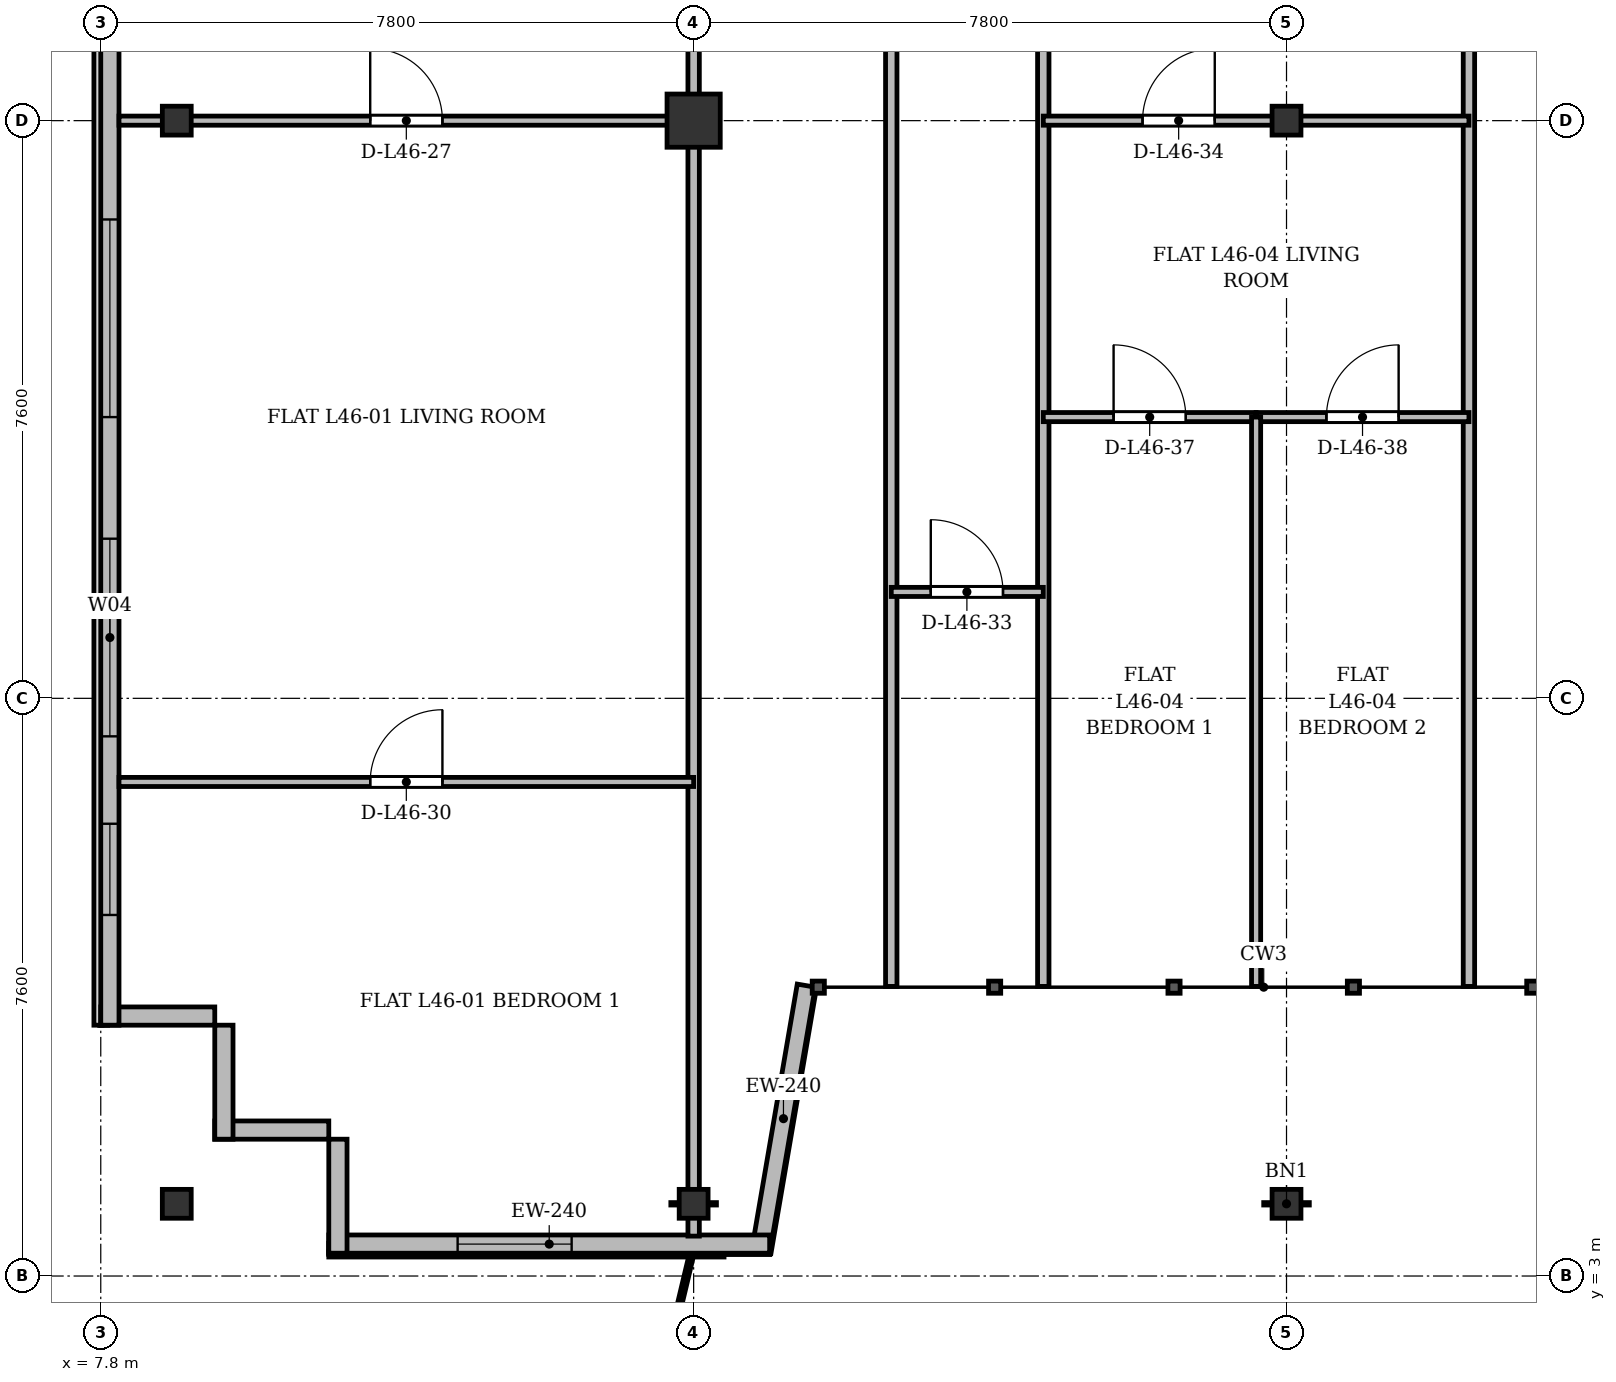
"""IFC4 building model, lengths in metres.
Left out: names, types, materials, properties, quantities, classifications, styles, units other than length and angle.
Written with IfcOpenShell. Run it as: python <this file> out.ifc"""

import sys

from ifc_helpers import new_model, si_unit, direction, frame, frame_2d, origin, origin_2d, place, context, subcontext, project, spatial, rectangle, i_section, extrude, source, transform, mapped, element, fill, save


model = new_model("IFC4")
c1 = context("Model", 3, precision=1e-05, world=origin(), true_north=direction((0.0, 1.0)))
c2 = subcontext(c1, "Body", "Model", "MODEL_VIEW")
j1 = project(units=[si_unit("LENGTHUNIT", "METRE"), si_unit("PLANEANGLEUNIT", "RADIAN")], contexts=[c1])
p1 = place(None, origin())
s1 = spatial("IfcSite", under=j1, at=p1, CompositionType="ELEMENT")
p2 = place(p1, origin())
s2 = spatial("IfcBuilding", under=s1, at=p2, CompositionType="ELEMENT")
p3 = place(p2, frame((0.0, 0.0, 175.3)))
s3 = spatial("IfcBuildingStorey", under=s2, at=p3, CompositionType="ELEMENT", Elevation=175.3)
m1 = source(origin(), c2, "Body", "SweptSolid", [
    extrude(i_section(OverallWidth=0.38, OverallDepth=0.38, WebThickness=0.02, FlangeThickness=0.03, at=origin_2d()), origin(), (0.0, 0.0, 1.0), 3.6),
])
for number, where, z_axis, x_axis in (
    (1, (8.8, 3.95, 0.0), (0.0, 0.0, 1.0), (1.0, 0.0, 0.0)),
    (2, (8.8, 18.2, 0.0), (0.0, 0.0, 1.0), (1.0, 0.0, 0.0)),
    (3, (15.6, 3.95, 0.0), (0.0, 0.0, 1.0), (1.0, 0.0, 0.0)),
):
    element("IfcColumn", number, at=place(p3, frame(where, z_axis=z_axis, x_axis=x_axis)), inside=s3, PredefinedType="COLUMN", context=c2, shape_type="MappedRepresentation", body=[
        mapped(m1, transform((0.0, 0.0, 0.0), x_axis=(1.0, 0.0, 0.0), y_axis=(0.0, 1.0, 0.0), z_axis=(0.0, 0.0, 1.0), scale=1.0)),
    ])
m2 = source(origin(), c2, "Body", "SweptSolid", [
    extrude(rectangle(XDim=0.7, YDim=0.7, at=origin_2d()), origin(), (0.0, 0.0, 1.0), 3.6),
])
p4 = place(p3, frame((15.6, 18.2, 0.0), z_axis=(0.0, 0.0, 1.0), x_axis=(1.0, 0.0, 0.0)))
e4 = element("IfcColumn", 4, at=p4, inside=s3, PredefinedType="COLUMN", context=c2, shape_type="MappedRepresentation", body=[
    mapped(m2, transform((0.0, 0.0, 0.0), x_axis=(1.0, 0.0, 0.0), y_axis=(0.0, 1.0, 0.0), z_axis=(0.0, 0.0, 1.0), scale=1.0)),
])
for number, where, z_axis, x_axis in (
    (5, (23.4, 3.95, 0.0), (0.0, 0.0, 1.0), (1.0, 0.0, 0.0)),
    (6, (23.4, 18.2, 0.0), (0.0, 0.0, 1.0), (1.0, 0.0, 0.0)),
):
    element("IfcColumn", number, at=place(p3, frame(where, z_axis=z_axis, x_axis=x_axis)), inside=s3, PredefinedType="COLUMN", context=c2, shape_type="MappedRepresentation", body=[
        mapped(m1, transform((0.0, 0.0, 0.0), x_axis=(1.0, 0.0, 0.0), y_axis=(0.0, 1.0, 0.0), z_axis=(0.0, 0.0, 1.0), scale=1.0)),
    ])
for number, where, z_axis, x_axis in (
    (7, (10.8, 4.92, 0.0), (0.0, 0.0, 1.0), (-1.0, 0.0, 0.0)),
    (8, (9.42, 4.8, 0.0), (0.0, 0.0, 1.0), (0.0, 1.0, 0.0)),
):
    element("IfcWall", number, at=place(p3, frame(where, z_axis=z_axis, x_axis=x_axis)), inside=s3, PredefinedType="SOLIDWALL", context=c2, shape_type="SweptSolid", body=[
        extrude(rectangle(XDim=1.5, YDim=0.24, at=frame_2d((0.75, 0.0))), origin(), (0.0, 0.0, 1.0), 3.35),
    ])
p5 = place(p3, frame((9.3, 6.42, 0.0), z_axis=(0.0, 0.0, 1.0), x_axis=(-1.0, 0.0, 0.0)))
e9 = element("IfcWall", 9, at=p5, inside=s3, PredefinedType="SOLIDWALL", context=c2, shape_type="SweptSolid", body=[
    extrude(rectangle(XDim=1.5, YDim=0.24, at=frame_2d((0.75, 0.0))), origin(), (0.0, 0.0, 1.0), 2.85),
])
p6 = place(p3, frame((7.92, 6.3, 0.0), z_axis=(0.0, 0.0, 1.0), x_axis=(0.0, 1.0, 0.0)))
e10 = element("IfcWall", 10, at=p6, inside=s3, PredefinedType="SOLIDWALL", context=c2, shape_type="SweptSolid", body=[
    extrude(rectangle(XDim=39.2, YDim=0.24, at=frame_2d((19.6, 0.0))), origin(), (0.0, 0.0, 1.0), 3.35),
])
p7 = place(p6, frame((1.45, 0.0, 0.92)))
e11 = element("IfcOpeningElement", 11, at=p7, cuts=e10, PredefinedType="OPENING", context=c2, shape_type="SweptSolid", body=[
    extrude(rectangle(XDim=1.2, YDim=1.65, at=frame_2d((0.6, 0.825))), frame((0.0, 0.13, 0.0), z_axis=(0.0, -1.0, 0.0), x_axis=(1.0, 0.0, 0.0)), (0.0, 0.0, 1.0), 0.26),
])
p8 = place(p6, frame((3.8, 0.0, 0.92)))
e12 = element("IfcOpeningElement", 12, at=p8, cuts=e10, PredefinedType="OPENING", context=c2, shape_type="SweptSolid", body=[
    extrude(rectangle(XDim=2.6, YDim=1.9, at=frame_2d((1.3, 0.95))), frame((0.0, 0.13, 0.0), z_axis=(0.0, -1.0, 0.0), x_axis=(1.0, 0.0, 0.0)), (0.0, 0.0, 1.0), 0.26),
])
p9 = place(p6, frame((8.0, 0.0, 0.92)))
e13 = element("IfcOpeningElement", 13, at=p9, cuts=e10, PredefinedType="OPENING", context=c2, shape_type="SweptSolid", body=[
    extrude(rectangle(XDim=2.6, YDim=1.9, at=frame_2d((1.3, 0.95))), frame((0.0, 0.13, 0.0), z_axis=(0.0, -1.0, 0.0), x_axis=(1.0, 0.0, 0.0)), (0.0, 0.0, 1.0), 0.26),
])
p10 = place(p6, frame((15.2, 0.0, 0.92)))
e14 = element("IfcOpeningElement", 14, at=p10, cuts=e10, PredefinedType="OPENING", context=c2, shape_type="SweptSolid", body=[
    extrude(rectangle(XDim=2.6, YDim=1.9, at=frame_2d((1.3, 0.95))), frame((0.0, 0.13, 0.0), z_axis=(0.0, -1.0, 0.0), x_axis=(1.0, 0.0, 0.0)), (0.0, 0.0, 1.0), 0.26),
])
p11 = place(p6, frame((33.5, 0.0, 0.92)))
e15 = element("IfcOpeningElement", 15, at=p11, cuts=e10, PredefinedType="OPENING", context=c2, shape_type="SweptSolid", body=[
    extrude(rectangle(XDim=1.2, YDim=1.65, at=frame_2d((0.6, 0.825))), frame((0.0, 0.13, 0.0), z_axis=(0.0, -1.0, 0.0), x_axis=(1.0, 0.0, 0.0)), (0.0, 0.0, 1.0), 0.26),
])
p12 = place(p6, frame((36.85, 0.0, 0.92)))
e16 = element("IfcOpeningElement", 16, at=p12, cuts=e10, PredefinedType="OPENING", context=c2, shape_type="SweptSolid", body=[
    extrude(rectangle(XDim=1.2, YDim=1.65, at=frame_2d((0.6, 0.825))), frame((0.0, 0.13, 0.0), z_axis=(0.0, -1.0, 0.0), x_axis=(1.0, 0.0, 0.0)), (0.0, 0.0, 1.0), 0.26),
])
p13 = place(p3, frame((17.082, 6.82, 0.0), z_axis=(0.0, 0.0, 1.0), x_axis=(-0.168990530437, -0.98561767467, 0.0)))
e17 = element("IfcWall", 17, at=p13, inside=s3, PredefinedType="SOLIDWALL", context=c2, shape_type="SweptSolid", body=[
    extrude(rectangle(XDim=3.551, YDim=0.24, at=frame_2d((1.775, 0.0))), origin(), (0.0, 0.0, 1.0), 2.75),
])
p14 = place(p3, frame((16.6, 3.42, 0.0), z_axis=(0.0, 0.0, 1.0), x_axis=(-1.0, 0.0, 0.0)))
e18 = element("IfcWall", 18, at=p14, inside=s3, PredefinedType="SOLIDWALL", context=c2, shape_type="SweptSolid", body=[
    extrude(rectangle(XDim=5.8, YDim=0.24, at=frame_2d((2.9, 0.0))), origin(), (0.0, 0.0, 1.0), 3.35),
])
p15 = place(p14, frame((2.605, 0.0, 0.9)))
e19 = element("IfcOpeningElement", 19, at=p15, cuts=e18, PredefinedType="OPENING", context=c2, shape_type="SweptSolid", body=[
    extrude(rectangle(XDim=1.5, YDim=1.75, at=frame_2d((0.75, 0.875))), frame((0.0, 0.13, 0.0), z_axis=(0.0, -1.0, 0.0), x_axis=(1.0, 0.0, 0.0)), (0.0, 0.0, 1.0), 0.26),
])
p16 = place(p3, frame((10.92, 3.3, 0.0), z_axis=(0.0, 0.0, 1.0), x_axis=(0.0, 1.0, 0.0)))
e20 = element("IfcWall", 20, at=p16, inside=s3, PredefinedType="SOLIDWALL", context=c2, shape_type="SweptSolid", body=[
    extrude(rectangle(XDim=1.5, YDim=0.24, at=frame_2d((0.75, 0.0))), origin(), (0.0, 0.0, 1.0), 2.75),
])
p17 = place(p3, frame((15.6, 3.525, 0.0), z_axis=(0.0, 0.0, 1.0), x_axis=(0.0, 1.0, 0.0)))
e21 = element("IfcWall", 21, at=p17, inside=s3, PredefinedType="PARTITIONING", context=c2, shape_type="SweptSolid", body=[
    extrude(rectangle(XDim=27.275, YDim=0.15, at=frame_2d((13.638, 0.0))), origin(), (0.0, 0.0, 1.0), 2.85),
])
p18 = place(p3, frame((25.8, 6.81, 0.0), z_axis=(0.0, 0.0, 1.0), x_axis=(0.0, 1.0, 0.0)))
e22 = element("IfcWall", 22, at=p18, inside=s3, PredefinedType="PARTITIONING", context=c2, shape_type="SweptSolid", body=[
    extrude(rectangle(XDim=23.99, YDim=0.15, at=frame_2d((11.995, 0.0))), origin(), (0.0, 0.0, 1.0), 2.75),
])
p19 = place(p3, frame((8.04, 18.2, 0.0), z_axis=(0.0, 0.0, 1.0), x_axis=(1.0, 0.0, 0.0)))
e23 = element("IfcWall", 23, at=p19, inside=s3, PredefinedType="PARTITIONING", context=c2, shape_type="SweptSolid", body=[
    extrude(rectangle(XDim=7.56, YDim=0.12, at=frame_2d((3.78, 0.0))), origin(), (0.0, 0.0, 1.0), 2.75),
])
p20 = place(p19, frame((3.305, 0.0, 0.0)))
e24 = element("IfcOpeningElement", 24, at=p20, cuts=e23, PredefinedType="OPENING", context=c2, shape_type="SweptSolid", body=[
    extrude(rectangle(XDim=0.95, YDim=2.15, at=frame_2d((0.475, 1.075))), frame((0.0, 0.07, 0.0), z_axis=(0.0, -1.0, 0.0), x_axis=(1.0, 0.0, 0.0)), (0.0, 0.0, 1.0), 0.14),
])
p21 = place(p3, frame((8.04, 9.5, 0.0), z_axis=(0.0, 0.0, 1.0), x_axis=(1.0, 0.0, 0.0)))
e25 = element("IfcWall", 25, at=p21, inside=s3, PredefinedType="PARTITIONING", context=c2, shape_type="SweptSolid", body=[
    extrude(rectangle(XDim=7.56, YDim=0.12, at=frame_2d((3.78, 0.0))), origin(), (0.0, 0.0, 1.0), 2.85),
])
p22 = place(p21, frame((3.305, 0.0, 0.0)))
e26 = element("IfcOpeningElement", 26, at=p22, cuts=e25, PredefinedType="OPENING", context=c2, shape_type="SweptSolid", body=[
    extrude(rectangle(XDim=0.95, YDim=2.15, at=frame_2d((0.475, 1.075))), frame((0.0, 0.07, 0.0), z_axis=(0.0, -1.0, 0.0), x_axis=(1.0, 0.0, 0.0)), (0.0, 0.0, 1.0), 0.14),
])
for number, where, z_axis, x_axis in (
    (27, (18.2, 6.81, 0.0), (0.0, 0.0, 1.0), (0.0, 1.0, 0.0)),
    (28, (20.2, 6.81, 0.0), (0.0, 0.0, 1.0), (0.0, 1.0, 0.0)),
):
    element("IfcWall", number, at=place(p3, frame(where, z_axis=z_axis, x_axis=x_axis)), inside=s3, PredefinedType="PARTITIONING", context=c2, shape_type="SweptSolid", body=[
        extrude(rectangle(XDim=23.99, YDim=0.15, at=frame_2d((11.995, 0.0))), origin(), (0.0, 0.0, 1.0), 2.75),
    ])
p23 = place(p3, frame((18.2, 12.0, 0.0), z_axis=(0.0, 0.0, 1.0), x_axis=(1.0, 0.0, 0.0)))
e29 = element("IfcWall", 29, at=p23, inside=s3, PredefinedType="PARTITIONING", context=c2, shape_type="SweptSolid", body=[
    extrude(rectangle(XDim=2.0, YDim=0.12, at=frame_2d((1.0, 0.0))), origin(), (0.0, 0.0, 1.0), 3.35),
])
p24 = place(p23, frame((0.52, 0.0, 0.0)))
e30 = element("IfcOpeningElement", 30, at=p24, cuts=e29, PredefinedType="OPENING", context=c2, shape_type="SweptSolid", body=[
    extrude(rectangle(XDim=0.95, YDim=2.15, at=frame_2d((0.475, 1.075))), frame((0.0, 0.07, 0.0), z_axis=(0.0, -1.0, 0.0), x_axis=(1.0, 0.0, 0.0)), (0.0, 0.0, 1.0), 0.14),
])
p25 = place(p3, frame((20.2, 18.2, 0.0), z_axis=(0.0, 0.0, 1.0), x_axis=(1.0, 0.0, 0.0)))
e31 = element("IfcWall", 31, at=p25, inside=s3, PredefinedType="PARTITIONING", context=c2, shape_type="SweptSolid", body=[
    extrude(rectangle(XDim=5.6, YDim=0.12, at=frame_2d((2.8, 0.0))), origin(), (0.0, 0.0, 1.0), 2.75),
])
p26 = place(p25, frame((1.306, 0.0, 0.0)))
e32 = element("IfcOpeningElement", 32, at=p26, cuts=e31, PredefinedType="OPENING", context=c2, shape_type="SweptSolid", body=[
    extrude(rectangle(XDim=0.95, YDim=2.15, at=frame_2d((0.475, 1.075))), frame((0.0, 0.07, 0.0), z_axis=(0.0, -1.0, 0.0), x_axis=(1.0, 0.0, 0.0)), (0.0, 0.0, 1.0), 0.14),
])
p27 = place(p3, frame((20.2, 14.3, 0.0), z_axis=(0.0, 0.0, 1.0), x_axis=(1.0, 0.0, 0.0)))
e33 = element("IfcWall", 33, at=p27, inside=s3, PredefinedType="PARTITIONING", context=c2, shape_type="SweptSolid", body=[
    extrude(rectangle(XDim=2.8, YDim=0.12, at=frame_2d((1.4, 0.0))), origin(), (0.0, 0.0, 1.0), 3.35),
])
p28 = place(p27, frame((0.925, 0.0, 0.0)))
e34 = element("IfcOpeningElement", 34, at=p28, cuts=e33, PredefinedType="OPENING", context=c2, shape_type="SweptSolid", body=[
    extrude(rectangle(XDim=0.95, YDim=2.15, at=frame_2d((0.475, 1.075))), frame((0.0, 0.07, 0.0), z_axis=(0.0, -1.0, 0.0), x_axis=(1.0, 0.0, 0.0)), (0.0, 0.0, 1.0), 0.14),
])
p29 = place(p3, frame((23.0, 14.3, 0.0), z_axis=(0.0, 0.0, 1.0), x_axis=(1.0, 0.0, 0.0)))
e35 = element("IfcWall", 35, at=p29, inside=s3, PredefinedType="PARTITIONING", context=c2, shape_type="SweptSolid", body=[
    extrude(rectangle(XDim=2.8, YDim=0.12, at=frame_2d((1.4, 0.0))), origin(), (0.0, 0.0, 1.0), 2.85),
])
p30 = place(p29, frame((0.925, 0.0, 0.0)))
e36 = element("IfcOpeningElement", 36, at=p30, cuts=e35, PredefinedType="OPENING", context=c2, shape_type="SweptSolid", body=[
    extrude(rectangle(XDim=0.95, YDim=2.15, at=frame_2d((0.475, 1.075))), frame((0.0, 0.07, 0.0), z_axis=(0.0, -1.0, 0.0), x_axis=(1.0, 0.0, 0.0)), (0.0, 0.0, 1.0), 0.14),
])
p31 = place(p3, frame((23.0, 6.81, 0.0), z_axis=(0.0, 0.0, 1.0), x_axis=(0.0, 1.0, 0.0)))
e37 = element("IfcWall", 37, at=p31, inside=s3, PredefinedType="PARTITIONING", context=c2, shape_type="SweptSolid", body=[
    extrude(rectangle(XDim=7.49, YDim=0.12, at=frame_2d((3.745, 0.0))), origin(), (0.0, 0.0, 1.0), 3.35),
])
m3 = source(origin(), c2, "Body", "SweptSolid", [
    extrude(rectangle(XDim=1.2, YDim=1.65, at=frame_2d((0.6, 0.825))), frame((0.0, 0.03, 0.0), z_axis=(0.0, -1.0, 0.0), x_axis=(1.0, 0.0, 0.0)), (0.0, 0.0, 1.0), 0.06),
])
p32 = place(p7, origin())
e38 = element("IfcWindow", 38, at=p32, inside=s3, PartitioningType="SINGLE_PANEL", PredefinedType="WINDOW", context=c2, shape_type="MappedRepresentation", body=[
    mapped(m3, transform((0.0, 0.0, 0.0), x_axis=(1.0, 0.0, 0.0), y_axis=(0.0, 1.0, 0.0), z_axis=(0.0, 0.0, 1.0), scale=1.0)),
])
fill(e11, e38)
m4 = source(origin(), c2, "Body", "SweptSolid", [
    extrude(rectangle(XDim=2.6, YDim=1.9, at=frame_2d((1.3, 0.95))), frame((0.0, 0.03, 0.0), z_axis=(0.0, -1.0, 0.0), x_axis=(1.0, 0.0, 0.0)), (0.0, 0.0, 1.0), 0.06),
])
p33 = place(p8, origin())
e39 = element("IfcWindow", 39, at=p33, inside=s3, PartitioningType="SINGLE_PANEL", PredefinedType="WINDOW", context=c2, shape_type="MappedRepresentation", body=[
    mapped(m4, transform((0.0, 0.0, 0.0), x_axis=(1.0, 0.0, 0.0), y_axis=(0.0, 1.0, 0.0), z_axis=(0.0, 0.0, 1.0), scale=1.0)),
])
fill(e12, e39)
p34 = place(p9, origin())
e40 = element("IfcWindow", 40, at=p34, inside=s3, PartitioningType="SINGLE_PANEL", PredefinedType="WINDOW", context=c2, shape_type="MappedRepresentation", body=[
    mapped(m4, transform((0.0, 0.0, 0.0), x_axis=(1.0, 0.0, 0.0), y_axis=(0.0, 1.0, 0.0), z_axis=(0.0, 0.0, 1.0), scale=1.0)),
])
fill(e13, e40)
m5 = source(origin(), c2, "Body", "SweptSolid", [
    extrude(rectangle(XDim=1.5, YDim=1.75, at=frame_2d((0.75, 0.875))), frame((0.0, 0.03, 0.0), z_axis=(0.0, -1.0, 0.0), x_axis=(1.0, 0.0, 0.0)), (0.0, 0.0, 1.0), 0.06),
])
p35 = place(p15, origin())
e41 = element("IfcWindow", 41, at=p35, inside=s3, PartitioningType="SINGLE_PANEL", PredefinedType="WINDOW", context=c2, shape_type="MappedRepresentation", body=[
    mapped(m5, transform((0.0, 0.0, 0.0), x_axis=(1.0, 0.0, 0.0), y_axis=(0.0, 1.0, 0.0), z_axis=(0.0, 0.0, 1.0), scale=1.0)),
])
fill(e19, e41)
m6 = source(origin(), c2, "Body", "SweptSolid", [
    extrude(rectangle(XDim=0.95, YDim=2.15, at=frame_2d((0.475, 1.075))), frame((0.0, 0.025, 0.0), z_axis=(0.0, -1.0, 0.0), x_axis=(1.0, 0.0, 0.0)), (0.0, 0.0, 1.0), 0.05),
])
p36 = place(p20, origin())
e42 = element("IfcDoor", 42, at=p36, inside=s3, OperationType="SINGLE_SWING_LEFT", PredefinedType="DOOR", context=c2, shape_type="MappedRepresentation", body=[
    mapped(m6, transform((0.0, 0.0, 0.0), x_axis=(1.0, 0.0, 0.0), y_axis=(0.0, 1.0, 0.0), z_axis=(0.0, 0.0, 1.0), scale=1.0)),
])
fill(e24, e42)
p37 = place(p22, origin())
e43 = element("IfcDoor", 43, at=p37, inside=s3, OperationType="SINGLE_SWING_RIGHT", PredefinedType="DOOR", context=c2, shape_type="MappedRepresentation", body=[
    mapped(m6, transform((0.0, 0.0, 0.0), x_axis=(1.0, 0.0, 0.0), y_axis=(0.0, 1.0, 0.0), z_axis=(0.0, 0.0, 1.0), scale=1.0)),
])
fill(e26, e43)
p38 = place(p24, origin())
e44 = element("IfcDoor", 44, at=p38, inside=s3, OperationType="SINGLE_SWING_LEFT", PredefinedType="DOOR", context=c2, shape_type="MappedRepresentation", body=[
    mapped(m6, transform((0.0, 0.0, 0.0), x_axis=(1.0, 0.0, 0.0), y_axis=(0.0, 1.0, 0.0), z_axis=(0.0, 0.0, 1.0), scale=1.0)),
])
fill(e30, e44)
p39 = place(p26, origin())
e45 = element("IfcDoor", 45, at=p39, inside=s3, OperationType="SINGLE_SWING_RIGHT", PredefinedType="DOOR", context=c2, shape_type="MappedRepresentation", body=[
    mapped(m6, transform((0.0, 0.0, 0.0), x_axis=(1.0, 0.0, 0.0), y_axis=(0.0, 1.0, 0.0), z_axis=(0.0, 0.0, 1.0), scale=1.0)),
])
fill(e32, e45)
p40 = place(p28, origin())
e46 = element("IfcDoor", 46, at=p40, inside=s3, OperationType="SINGLE_SWING_LEFT", PredefinedType="DOOR", context=c2, shape_type="MappedRepresentation", body=[
    mapped(m6, transform((0.0, 0.0, 0.0), x_axis=(1.0, 0.0, 0.0), y_axis=(0.0, 1.0, 0.0), z_axis=(0.0, 0.0, 1.0), scale=1.0)),
])
fill(e34, e46)
p41 = place(p30, origin())
e47 = element("IfcDoor", 47, at=p41, inside=s3, OperationType="SINGLE_SWING_RIGHT", PredefinedType="DOOR", context=c2, shape_type="MappedRepresentation", body=[
    mapped(m6, transform((0.0, 0.0, 0.0), x_axis=(1.0, 0.0, 0.0), y_axis=(0.0, 1.0, 0.0), z_axis=(0.0, 0.0, 1.0), scale=1.0)),
])
fill(e36, e47)
save(model, sys.argv[1])
